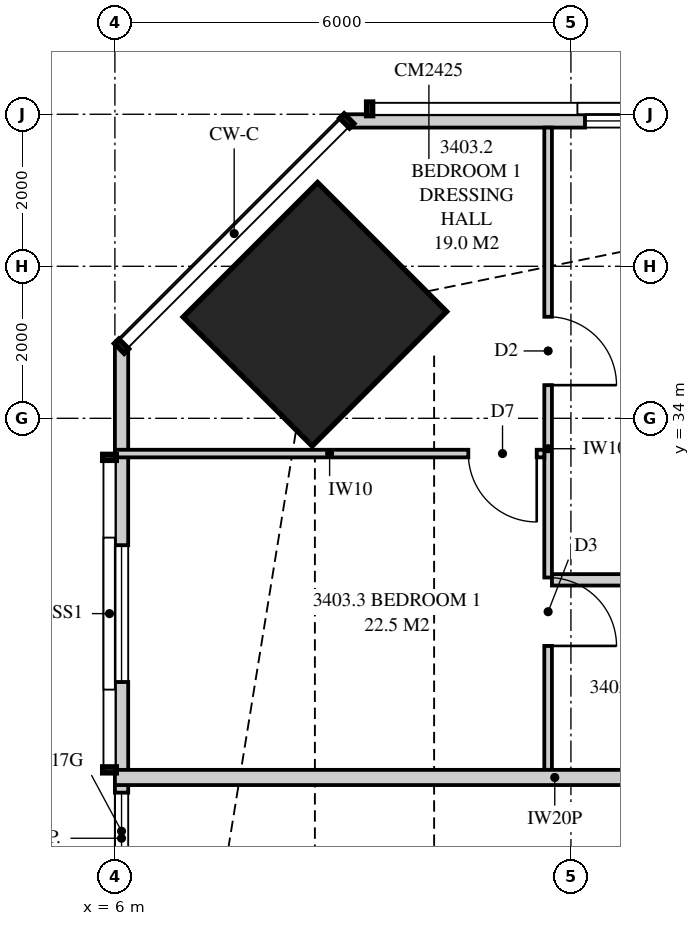
"""IFC4 building model, lengths in metres.
Left out: names, types, materials, properties, quantities, classifications, styles, units other than length and angle.
Written with IfcOpenShell. Run it as: python <this file> out.ifc"""

import sys

from ifc_helpers import new_model, si_unit, direction, frame, frame_2d, origin, origin_2d, place, context, subcontext, project, spatial, polyline, rectangle, outline, extrude, element, fill, save


model = new_model("IFC4")
c1 = context("Model", 3, precision=1e-05, world=origin(), true_north=direction((0.0, 1.0)))
c2 = subcontext(c1, "Body", "Model", "MODEL_VIEW")
j1 = project(units=[si_unit("LENGTHUNIT", "METRE"), si_unit("PLANEANGLEUNIT", "RADIAN")], contexts=[c1])
p1 = place(None, origin())
s1 = spatial("IfcSite", under=j1, at=p1, CompositionType="ELEMENT")
p2 = place(p1, origin())
s2 = spatial("IfcBuilding", under=s1, at=p2, CompositionType="ELEMENT")
p3 = place(p2, frame((0.0, 0.0, 124.95)))
s3 = spatial("IfcBuildingStorey", under=s2, at=p3, CompositionType="ELEMENT", Elevation=124.95)
p4 = place(p3, frame((8.631, 35.369, 0.0), z_axis=(0.0, 0.0, 1.0), x_axis=(0.707106781187, -0.707106781187, 0.0)))
e1 = element("IfcColumn", 1, at=p4, inside=s3, PredefinedType="COLUMN", context=c2, shape_type="SweptSolid", body=[
    extrude(rectangle(XDim=2.4, YDim=2.5, at=origin_2d()), origin(), (0.0, 0.0, 1.0), 3.35),
])
p5 = place(p3, frame((22.05, 37.913, 0.0), z_axis=(0.0, 0.0, 1.0), x_axis=(-1.0, 0.0, 0.0)))
e2 = element("IfcWall", 2, at=p5, inside=s3, PredefinedType="SOLIDWALL", context=c2, shape_type="SweptSolid", body=[
    extrude(outline(polyline([(0.0, 0.0), (12.999, 0.0), (12.999, 3.11), (5.378, 3.11), (5.378, 2.15), (5.333, 2.15), (5.333, 3.11), (5.175, 3.11), (5.175, 2.15), (0.0, 2.15), (0.0, 0.0)])), frame((0.0, 0.087, 0.0), z_axis=(0.0, -1.0, 0.0), x_axis=(1.0, 0.0, 0.0)), (0.0, 0.0, 1.0), 0.175),
])
p6 = place(p5, frame((0.492, 0.0, 0.4)))
e3 = element("IfcOpeningElement", 3, at=p6, cuts=e2, PredefinedType="OPENING", context=c2, shape_type="SweptSolid", body=[
    extrude(rectangle(XDim=1.8, YDim=1.7, at=frame_2d((0.9, 0.85))), frame((0.0, 0.097, 0.0), z_axis=(0.0, -1.0, 0.0), x_axis=(1.0, 0.0, 0.0)), (0.0, 0.0, 1.0), 0.195),
])
p7 = place(p5, frame((8.065, 0.0, 0.4)))
e4 = element("IfcOpeningElement", 4, at=p7, cuts=e2, PredefinedType="OPENING", context=c2, shape_type="SweptSolid", body=[
    extrude(rectangle(XDim=1.8, YDim=1.7, at=frame_2d((0.9, 0.85))), frame((0.0, 0.097, 0.0), z_axis=(0.0, -1.0, 0.0), x_axis=(1.0, 0.0, 0.0)), (0.0, 0.0, 1.0), 0.195),
])
p8 = place(p3, frame((6.087, 34.949, 0.0), z_axis=(0.0, 0.0, 1.0), x_axis=(0.0, -1.0, 0.0)))
e5 = element("IfcWall", 5, at=p8, inside=s3, PredefinedType="SOLIDWALL", context=c2, shape_type="SweptSolid", body=[
    extrude(outline(polyline([(0.0, 0.0), (12.761, 0.0), (12.761, 2.15), (9.949, 2.15), (9.949, 3.11), (9.823, 3.11), (9.823, 2.15), (9.73, 2.15), (9.73, 3.11), (0.0, 3.11), (0.0, 0.0)])), frame((0.0, 0.087, 0.0), z_axis=(0.0, -1.0, 0.0), x_axis=(1.0, 0.0, 0.0)), (0.0, 0.0, 1.0), 0.175),
])
p9 = place(p8, frame((2.618, 0.0, 0.4)))
e6 = element("IfcOpeningElement", 6, at=p9, cuts=e5, PredefinedType="OPENING", context=c2, shape_type="SweptSolid", body=[
    extrude(rectangle(XDim=1.8, YDim=1.7, at=frame_2d((0.9, 0.85))), frame((0.0, 0.097, 0.0), z_axis=(0.0, -1.0, 0.0), x_axis=(1.0, 0.0, 0.0)), (0.0, 0.0, 1.0), 0.195),
])
p10 = place(p8, frame((5.874, 0.0, 0.4)))
e7 = element("IfcOpeningElement", 7, at=p10, cuts=e5, PredefinedType="OPENING", context=c2, shape_type="SweptSolid", body=[
    extrude(rectangle(XDim=1.2, YDim=1.7, at=frame_2d((0.6, 0.85))), frame((0.0, 0.097, 0.0), z_axis=(0.0, -1.0, 0.0), x_axis=(1.0, 0.0, 0.0)), (0.0, 0.0, 1.0), 0.195),
])
p11 = place(p3, frame((11.7, 37.825, 0.0), z_axis=(0.0, 0.0, 1.0), x_axis=(0.0, -1.0, 0.0)))
e8 = element("IfcWall", 8, at=p11, inside=s3, PredefinedType="PARTITIONING", context=c2, shape_type="SweptSolid", body=[
    extrude(outline(polyline([(0.0, 0.0), (8.45, 0.0), (8.45, 3.11), (2.708, 3.11), (2.708, 2.15), (0.953, 2.15), (0.953, 3.11), (0.0, 3.11), (0.0, 0.0)])), frame((0.0, 0.05, 0.0), z_axis=(0.0, -1.0, 0.0), x_axis=(1.0, 0.0, 0.0)), (0.0, 0.0, 1.0), 0.1),
])
p12 = place(p11, frame((2.489, 0.0, 0.0)))
e9 = element("IfcOpeningElement", 9, at=p12, cuts=e8, PredefinedType="OPENING", context=c2, shape_type="SweptSolid", body=[
    extrude(rectangle(XDim=0.9, YDim=2.1, at=frame_2d((0.45, 1.05))), frame((0.0, 0.06, 0.0), z_axis=(0.0, -1.0, 0.0), x_axis=(1.0, 0.0, 0.0)), (0.0, 0.0, 1.0), 0.12),
])
p13 = place(p11, frame((5.919, 0.0, 0.0)))
e10 = element("IfcOpeningElement", 10, at=p13, cuts=e8, PredefinedType="OPENING", context=c2, shape_type="SweptSolid", body=[
    extrude(rectangle(XDim=0.9, YDim=2.1, at=frame_2d((0.45, 1.05))), frame((0.0, 0.06, 0.0), z_axis=(0.0, -1.0, 0.0), x_axis=(1.0, 0.0, 0.0)), (0.0, 0.0, 1.0), 0.12),
])
p14 = place(p3, frame((6.0, 33.536, 0.0), z_axis=(0.0, 0.0, 1.0), x_axis=(1.0, 0.0, 0.0)))
e11 = element("IfcWall", 11, at=p14, inside=s3, PredefinedType="PARTITIONING", context=c2, shape_type="SweptSolid", body=[
    extrude(outline(polyline([(0.0, 0.0), (5.65, 0.0), (5.65, 3.11), (5.46, 3.11), (5.46, 2.51), (3.206, 2.51), (3.206, 2.15), (1.463, 2.15), (1.463, 3.11), (0.0, 3.11), (0.0, 0.0)])), frame((0.0, 0.05, 0.0), z_axis=(0.0, -1.0, 0.0), x_axis=(1.0, 0.0, 0.0)), (0.0, 0.0, 1.0), 0.1),
])
p15 = place(p14, frame((4.65, 0.0, 0.0)))
e12 = element("IfcOpeningElement", 12, at=p15, cuts=e11, PredefinedType="OPENING", context=c2, shape_type="SweptSolid", body=[
    extrude(rectangle(XDim=0.9, YDim=2.1, at=frame_2d((0.45, 1.05))), frame((0.0, 0.06, 0.0), z_axis=(0.0, -1.0, 0.0), x_axis=(1.0, 0.0, 0.0)), (0.0, 0.0, 1.0), 0.12),
])
p16 = place(p3, frame((11.75, 31.875, 0.0), z_axis=(0.0, 0.0, 1.0), x_axis=(1.0, 0.0, 0.0)))
e13 = element("IfcWall", 13, at=p16, inside=s3, PredefinedType="PLUMBINGWALL", context=c2, shape_type="SweptSolid", body=[
    extrude(outline(polyline([(0.0, 0.0), (5.9, 0.0), (5.9, 3.11), (5.438, 3.11), (5.438, 2.541), (4.812, 2.541), (4.812, 3.11), (0.0, 3.11), (0.0, 0.0)])), frame((0.0, 0.075, 0.0), z_axis=(0.0, -1.0, 0.0), x_axis=(1.0, 0.0, 0.0)), (0.0, 0.0, 1.0), 0.15),
])
p17 = place(p16, frame((4.6, 0.0, 0.0)))
e14 = element("IfcOpeningElement", 14, at=p17, cuts=e13, PredefinedType="OPENING", context=c2, shape_type="SweptSolid", body=[
    extrude(rectangle(XDim=0.9, YDim=2.1, at=frame_2d((0.45, 1.05))), frame((0.0, 0.085, 0.0), z_axis=(0.0, -1.0, 0.0), x_axis=(1.0, 0.0, 0.0)), (0.0, 0.0, 1.0), 0.17),
])
p18 = place(p3, frame((6.0, 29.275, 0.0), z_axis=(0.0, 0.0, 1.0), x_axis=(1.0, 0.0, 0.0)))
e15 = element("IfcWall", 15, at=p18, inside=s3, PredefinedType="PARTITIONING", context=c2, shape_type="SweptSolid", body=[
    extrude(outline(polyline([(0.0, 0.0), (11.575, 0.0), (11.575, 3.11), (11.212, 3.11), (11.212, 2.541), (10.538, 2.541), (10.538, 3.11), (5.51, 3.11), (5.51, 2.51), (2.969, 2.51), (2.969, 2.541), (2.565, 2.541), (2.565, 2.15), (0.721, 2.15), (0.721, 3.11), (0.0, 3.11), (0.0, 0.0)])), frame((0.0, 0.1, 0.0), z_axis=(0.0, -1.0, 0.0), x_axis=(1.0, 0.0, 0.0)), (0.0, 0.0, 1.0), 0.2),
])
p19 = place(p7, origin())
e16 = element("IfcWindow", 16, at=p19, inside=s3, PartitioningType="SINGLE_PANEL", PredefinedType="WINDOW", context=c2, shape_type="SweptSolid", body=[
    extrude(rectangle(XDim=1.8, YDim=1.7, at=frame_2d((0.9, 0.85))), frame((0.0, 0.03, 0.0), z_axis=(0.0, -1.0, 0.0), x_axis=(1.0, 0.0, 0.0)), (0.0, 0.0, 1.0), 0.06),
])
fill(e4, e16)
p20 = place(p9, origin())
e17 = element("IfcWindow", 17, at=p20, inside=s3, PartitioningType="SINGLE_PANEL", PredefinedType="WINDOW", context=c2, shape_type="SweptSolid", body=[
    extrude(rectangle(XDim=1.8, YDim=1.7, at=frame_2d((0.9, 0.85))), frame((0.0, 0.03, 0.0), z_axis=(0.0, -1.0, 0.0), x_axis=(1.0, 0.0, 0.0)), (0.0, 0.0, 1.0), 0.06),
])
fill(e6, e17)
p21 = place(p10, origin())
e18 = element("IfcWindow", 18, at=p21, inside=s3, PartitioningType="SINGLE_PANEL", PredefinedType="WINDOW", context=c2, shape_type="SweptSolid", body=[
    extrude(rectangle(XDim=1.2, YDim=1.7, at=frame_2d((0.6, 0.85))), frame((0.0, 0.03, 0.0), z_axis=(0.0, -1.0, 0.0), x_axis=(1.0, 0.0, 0.0)), (0.0, 0.0, 1.0), 0.06),
])
fill(e7, e18)
p22 = place(p15, frame((0.9, 0.0, 0.0), z_axis=(0.0, 0.0, 1.0), x_axis=(-1.0, 0.0, 0.0)))
e19 = element("IfcDoor", 19, at=p22, inside=s3, OperationType="SINGLE_SWING_LEFT", PredefinedType="DOOR", context=c2, shape_type="SweptSolid", body=[
    extrude(rectangle(XDim=0.9, YDim=2.1, at=frame_2d((0.45, 1.05))), frame((0.0, 0.025, 0.0), z_axis=(0.0, -1.0, 0.0), x_axis=(1.0, 0.0, 0.0)), (0.0, 0.0, 1.0), 0.05),
])
fill(e12, e19)
p23 = place(p12, origin())
e20 = element("IfcDoor", 20, at=p23, inside=s3, OperationType="SINGLE_SWING_RIGHT", PredefinedType="DOOR", context=c2, shape_type="SweptSolid", body=[
    extrude(rectangle(XDim=0.9, YDim=2.1, at=frame_2d((0.45, 1.05))), frame((0.0, 0.025, 0.0), z_axis=(0.0, -1.0, 0.0), x_axis=(1.0, 0.0, 0.0)), (0.0, 0.0, 1.0), 0.05),
])
fill(e9, e20)
p24 = place(p13, origin())
e21 = element("IfcDoor", 21, at=p24, inside=s3, OperationType="SINGLE_SWING_RIGHT", PredefinedType="DOOR", context=c2, shape_type="SweptSolid", body=[
    extrude(rectangle(XDim=0.9, YDim=2.1, at=frame_2d((0.45, 1.05))), frame((0.0, 0.025, 0.0), z_axis=(0.0, -1.0, 0.0), x_axis=(1.0, 0.0, 0.0)), (0.0, 0.0, 1.0), 0.05),
])
fill(e10, e21)
save(model, sys.argv[1])
